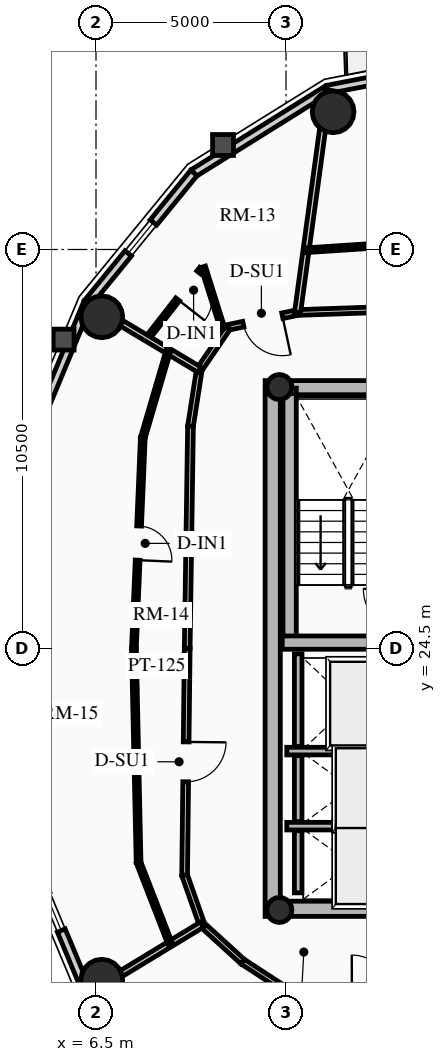
"""IFC4 building model, lengths in metres.
Left out: names, types, materials, properties, quantities, classifications, styles, units other than length and angle.
Written with IfcOpenShell. Run it as: python <this file> out.ifc"""

import sys

from ifc_helpers import new_model, si_unit, direction, frame, frame_2d, origin, origin_2d, place, context, subcontext, project, spatial, rectangle, circle, hollow_circle, extrude, source, transform, mapped, element, fill, save


model = new_model("IFC4")
c1 = context("Model", 3, precision=1e-05, world=origin(), true_north=direction((0.0, 1.0)))
c2 = subcontext(c1, "Body", "Model", "MODEL_VIEW")
j1 = project(units=[si_unit("LENGTHUNIT", "METRE"), si_unit("PLANEANGLEUNIT", "RADIAN")], contexts=[c1])
p1 = place(None, origin())
s1 = spatial("IfcSite", under=j1, at=p1, CompositionType="ELEMENT")
p2 = place(p1, origin())
s2 = spatial("IfcBuilding", under=s1, at=p2, CompositionType="ELEMENT")
p3 = place(p2, frame((0.0, 0.0, 217.03)))
s3 = spatial("IfcBuildingStorey", under=s2, at=p3, CompositionType="ELEMENT", Elevation=217.03)
p4 = place(p3, frame((11.15, 17.45, 0.0), z_axis=(0.0, 0.0, 1.0), x_axis=(0.0, 1.0, 0.0)))
e1 = element("IfcWall", 1, at=p4, inside=s3, PredefinedType="SHEAR", context=c2, shape_type="SweptSolid", body=[
    extrude(rectangle(XDim=14.1, YDim=0.4, at=frame_2d((7.05, 0.0))), origin(), (0.0, 0.0, 1.0), 2.91),
])
p5 = place(p3, frame((11.15, 17.65, 0.0), z_axis=(0.0, 0.0, 1.0), x_axis=(1.0, 0.0, 0.0)))
e2 = element("IfcWall", 2, at=p5, inside=s3, PredefinedType="SHEAR", context=c2, shape_type="SweptSolid", body=[
    extrude(rectangle(XDim=10.7, YDim=0.4, at=frame_2d((5.35, 0.0))), origin(), (0.0, 0.0, 1.0), 2.91),
])
m1 = source(origin(), c2, "Body", "SweptSolid", [
    extrude(rectangle(XDim=1.5, YDim=2.02, at=frame_2d((0.75, 1.01))), frame((0.0, 0.21, 0.0), z_axis=(0.0, -1.0, 0.0), x_axis=(1.0, 0.0, 0.0)), (0.0, 0.0, 1.0), 0.42),
])
p6 = place(p5, frame((5.45, 0.0, 0.0)))
e3 = element("IfcOpeningElement", 3, at=p6, cuts=e2, PredefinedType="OPENING", context=c2, shape_type="MappedRepresentation", body=[
    mapped(m1, transform((0.0, 0.0, 0.0), x_axis=(1.0, 0.0, 0.0), y_axis=(0.0, 1.0, 0.0), z_axis=(0.0, 0.0, 1.0), scale=1.0)),
])
p7 = place(p3, frame((11.15, 31.35, 0.0), z_axis=(0.0, 0.0, 1.0), x_axis=(1.0, 0.0, 0.0)))
e4 = element("IfcWall", 4, at=p7, inside=s3, PredefinedType="SHEAR", context=c2, shape_type="SweptSolid", body=[
    extrude(rectangle(XDim=10.7, YDim=0.4, at=frame_2d((5.35, 0.0))), origin(), (0.0, 0.0, 1.0), 2.91),
])
p8 = place(p7, frame((4.6, 0.0, 0.0)))
e5 = element("IfcOpeningElement", 5, at=p8, cuts=e4, PredefinedType="OPENING", context=c2, shape_type="MappedRepresentation", body=[
    mapped(m1, transform((0.0, 0.0, 0.0), x_axis=(1.0, 0.0, 0.0), y_axis=(0.0, 1.0, 0.0), z_axis=(0.0, 0.0, 1.0), scale=1.0)),
])
p9 = place(p3, frame((11.595, 24.655, 0.0), z_axis=(0.0, 0.0, 1.0), x_axis=(0.0, 1.0, 0.0)))
e6 = element("IfcWall", 6, at=p9, inside=s3, PredefinedType="SHEAR", context=c2, shape_type="SweptSolid", body=[
    extrude(rectangle(XDim=6.695, YDim=0.35, at=frame_2d((3.348, 0.0))), origin(), (0.0, 0.0, 1.0), 2.91),
])
p10 = place(p3, frame((11.4, 24.655, 0.0), z_axis=(0.0, 0.0, 1.0), x_axis=(1.0, 0.0, 0.0)))
e7 = element("IfcWall", 7, at=p10, inside=s3, PredefinedType="SHEAR", context=c2, shape_type="SweptSolid", body=[
    extrude(rectangle(XDim=3.285, YDim=0.35, at=frame_2d((1.643, 0.0))), origin(), (0.0, 0.0, 1.0), 2.91),
])
for number, where, z_axis, x_axis in (
    (8, (11.325, 17.62, 0.0), (0.0, 0.0, 1.0), (1.0, 0.0, 0.0)),
    (9, (11.325, 31.38, 0.0), (0.0, 0.0, 1.0), (1.0, 0.0, 0.0)),
):
    element("IfcColumn", number, at=place(p3, frame(where, z_axis=z_axis, x_axis=x_axis)), inside=s3, PredefinedType="COLUMN", context=c2, shape_type="SweptSolid", body=[
        extrude(hollow_circle(Radius=0.33, WallThickness=0.025, at=origin_2d()), origin(), (0.0, 0.0, 1.0), 2.91),
    ])
for number, where, z_axis, x_axis in (
    (10, (12.739, 38.623, 0.0), (0.0, 0.0, 1.0), (1.0, 0.0, 0.0)),
    (11, (6.653, 33.229, 0.0), (0.0, 0.0, 1.0), (1.0, 0.0, 0.0)),
    (12, (6.653, 15.771, 0.0), (0.0, 0.0, 1.0), (1.0, 0.0, 0.0)),
):
    element("IfcColumn", number, at=place(p3, frame(where, z_axis=z_axis, x_axis=x_axis)), inside=s3, PredefinedType="USERDEFINED", context=c2, shape_type="SweptSolid", body=[
        extrude(circle(Radius=0.55, at=origin_2d()), origin(), (0.0, 0.0, 1.0), 2.91),
    ])
p11 = place(p3, frame((12.597, 39.213, 0.0), z_axis=(0.0, 0.0, 1.0), x_axis=(0.981700307484, 0.190432419211, 0.0)))
e13 = element("IfcWall", 13, at=p11, inside=s3, PredefinedType="SOLIDWALL", context=c2, shape_type="SweptSolid", body=[
    extrude(rectangle(XDim=3.976, YDim=0.22, at=frame_2d((1.988, 0.0))), origin(), (0.0, 0.0, 1.0), 2.322),
])
m2 = source(origin(), c2, "Body", "SweptSolid", [
    extrude(rectangle(XDim=1.15, YDim=2.005, at=frame_2d((0.575, 1.002))), frame((0.0, 0.12, 0.0), z_axis=(0.0, -1.0, 0.0), x_axis=(1.0, 0.0, 0.0)), (0.0, 0.0, 1.0), 0.24),
])
p12 = place(p11, frame((1.413, 0.0, 0.0)))
e14 = element("IfcOpeningElement", 14, at=p12, cuts=e13, PredefinedType="OPENING", context=c2, shape_type="MappedRepresentation", body=[
    mapped(m2, transform((0.0, 0.0, 0.0), x_axis=(1.0, 0.0, 0.0), y_axis=(0.0, 1.0, 0.0), z_axis=(0.0, 0.0, 1.0), scale=1.0)),
])
p13 = place(p3, frame((9.076, 37.015, 0.0), z_axis=(0.0, 0.0, 1.0), x_axis=(0.848318713376, 0.529485939886, 0.0)))
e15 = element("IfcWall", 15, at=p13, inside=s3, PredefinedType="SOLIDWALL", context=c2, shape_type="SweptSolid", body=[
    extrude(rectangle(XDim=4.15, YDim=0.22, at=frame_2d((2.075, 0.0))), origin(), (0.0, 0.0, 1.0), 2.322),
])
p14 = place(p3, frame((6.282, 33.593, 0.0), z_axis=(0.0, 0.0, 1.0), x_axis=(0.632467166636, 0.774587169483, 0.0)))
e16 = element("IfcWall", 16, at=p14, inside=s3, PredefinedType="SOLIDWALL", context=c2, shape_type="SweptSolid", body=[
    extrude(rectangle(XDim=4.418, YDim=0.22, at=frame_2d((2.209, 0.0))), origin(), (0.0, 0.0, 1.0), 2.322),
])
m3 = source(origin(), c2, "Body", "SweptSolid", [
    extrude(rectangle(XDim=1.05, YDim=1.3, at=frame_2d((0.525, 0.65))), frame((0.0, 0.12, 0.0), z_axis=(0.0, -1.0, 0.0), x_axis=(1.0, 0.0, 0.0)), (0.0, 0.0, 1.0), 0.24),
])
p15 = place(p14, frame((1.684, 0.0, 0.65)))
e17 = element("IfcOpeningElement", 17, at=p15, cuts=e16, PredefinedType="OPENING", context=c2, shape_type="MappedRepresentation", body=[
    mapped(m3, transform((0.0, 0.0, 0.0), x_axis=(1.0, 0.0, 0.0), y_axis=(0.0, 1.0, 0.0), z_axis=(0.0, 0.0, 1.0), scale=1.0)),
])
p16 = place(p3, frame((4.488, 29.281, 0.0), z_axis=(0.0, 0.0, 1.0), x_axis=(0.384036305194, 0.923317993052, 0.0)))
e18 = element("IfcWall", 18, at=p16, inside=s3, PredefinedType="SOLIDWALL", context=c2, shape_type="SweptSolid", body=[
    extrude(rectangle(XDim=4.671, YDim=0.22, at=frame_2d((2.335, 0.0))), origin(), (0.0, 0.0, 1.0), 2.322),
])
p17 = place(p3, frame((6.282, 15.407, 0.0), z_axis=(0.0, 0.0, 1.0), x_axis=(-0.384036305194, 0.923317993052, 0.0)))
e19 = element("IfcWall", 19, at=p17, inside=s3, PredefinedType="SOLIDWALL", context=c2, shape_type="SweptSolid", body=[
    extrude(rectangle(XDim=4.671, YDim=0.22, at=frame_2d((2.335, 0.0))), origin(), (0.0, 0.0, 1.0), 2.322),
])
p18 = place(p17, frame((1.81, 0.0, 0.65)))
e20 = element("IfcOpeningElement", 20, at=p18, cuts=e19, PredefinedType="OPENING", context=c2, shape_type="MappedRepresentation", body=[
    mapped(m3, transform((0.0, 0.0, 0.0), x_axis=(1.0, 0.0, 0.0), y_axis=(0.0, 1.0, 0.0), z_axis=(0.0, 0.0, 1.0), scale=1.0)),
])
p19 = place(p3, frame((11.52, 21.8, 0.0), z_axis=(0.0, 0.0, 1.0), x_axis=(1.0, 0.0, 0.0)))
e21 = element("IfcWall", 21, at=p19, inside=s3, PredefinedType="SHEAR", context=c2, shape_type="SweptSolid", body=[
    extrude(rectangle(XDim=2.97, YDim=0.2, at=frame_2d((1.485, 0.0))), origin(), (0.0, 0.0, 1.0), 2.91),
])
p20 = place(p3, frame((11.82, 21.92, 0.0), z_axis=(0.0, 0.0, 1.0), x_axis=(0.0, 1.0, 0.0)))
e22 = element("IfcWall", 22, at=p20, inside=s3, PredefinedType="SHEAR", context=c2, shape_type="SweptSolid", body=[
    extrude(rectangle(XDim=2.44, YDim=0.2, at=frame_2d((1.22, 0.0))), origin(), (0.0, 0.0, 1.0), 2.91),
])
p21 = place(p3, frame((11.52, 19.825, 0.0), z_axis=(0.0, 0.0, 1.0), x_axis=(1.0, 0.0, 0.0)))
e23 = element("IfcWall", 23, at=p21, inside=s3, PredefinedType="SHEAR", context=c2, shape_type="SweptSolid", body=[
    extrude(rectangle(XDim=2.97, YDim=0.2, at=frame_2d((1.485, 0.0))), origin(), (0.0, 0.0, 1.0), 2.91),
])
p22 = place(p3, frame((11.82, 19.945, 0.0), z_axis=(0.0, 0.0, 1.0), x_axis=(0.0, 1.0, 0.0)))
e24 = element("IfcWall", 24, at=p22, inside=s3, PredefinedType="SHEAR", context=c2, shape_type="SweptSolid", body=[
    extrude(rectangle(XDim=1.735, YDim=0.2, at=frame_2d((0.867, 0.0))), origin(), (0.0, 0.0, 1.0), 2.91),
])
p23 = place(p3, frame((11.82, 18.07, 0.0), z_axis=(0.0, 0.0, 1.0), x_axis=(0.0, 1.0, 0.0)))
e25 = element("IfcWall", 25, at=p23, inside=s3, PredefinedType="SHEAR", context=c2, shape_type="SweptSolid", body=[
    extrude(rectangle(XDim=1.635, YDim=0.2, at=frame_2d((0.817, 0.0))), origin(), (0.0, 0.0, 1.0), 2.91),
])
p24 = place(p3, frame((18.082, 33.56, 0.0), z_axis=(0.0, 0.0, 1.0), x_axis=(-0.999399009709, -0.034664382185, 0.0)))
e26 = element("IfcWall", 26, at=p24, inside=s3, PredefinedType="PARTITIONING", context=c2, shape_type="SweptSolid", body=[
    extrude(rectangle(XDim=6.282, YDim=0.15, at=frame_2d((3.141, 0.0))), origin(), (0.0, 0.0, 1.0), 2.255),
])
p25 = place(p3, frame((11.803, 33.342, 0.0), z_axis=(0.0, 0.0, 1.0), x_axis=(-0.977750742783, -0.209770076483, 0.0)))
e27 = element("IfcWall", 27, at=p25, inside=s3, PredefinedType="PARTITIONING", context=c2, shape_type="SweptSolid", body=[
    extrude(rectangle(XDim=1.868, YDim=0.15, at=frame_2d((0.934, 0.0))), origin(), (0.0, 0.0, 1.0), 2.255),
])
m4 = source(origin(), c2, "Body", "SweptSolid", [
    extrude(rectangle(XDim=1.05, YDim=2.015, at=frame_2d((0.525, 1.007))), frame((0.0, 0.085, 0.0), z_axis=(0.0, -1.0, 0.0), x_axis=(1.0, 0.0, 0.0)), (0.0, 0.0, 1.0), 0.17),
])
p26 = place(p25, frame((0.409, 0.0, 0.0)))
e28 = element("IfcOpeningElement", 28, at=p26, cuts=e27, PredefinedType="OPENING", context=c2, shape_type="MappedRepresentation", body=[
    mapped(m4, transform((0.0, 0.0, 0.0), x_axis=(1.0, 0.0, 0.0), y_axis=(0.0, 1.0, 0.0), z_axis=(0.0, 0.0, 1.0), scale=1.0)),
])
p27 = place(p3, frame((9.977, 32.95, 0.0), z_axis=(0.0, 0.0, 1.0), x_axis=(-0.563291804539, -0.826258036535, 0.0)))
e29 = element("IfcWall", 29, at=p27, inside=s3, PredefinedType="PARTITIONING", context=c2, shape_type="SweptSolid", body=[
    extrude(rectangle(XDim=1.346, YDim=0.15, at=frame_2d((0.673, 0.0))), origin(), (0.0, 0.0, 1.0), 2.322),
])
p28 = place(p3, frame((9.219, 31.838, 0.0), z_axis=(0.0, 0.0, 1.0), x_axis=(-0.154065528966, -0.98806063214, 0.0)))
e30 = element("IfcWall", 30, at=p28, inside=s3, PredefinedType="PARTITIONING", context=c2, shape_type="SweptSolid", body=[
    extrude(rectangle(XDim=1.507, YDim=0.15, at=frame_2d((0.753, 0.0))), origin(), (0.0, 0.0, 1.0), 2.255),
])
p29 = place(p3, frame((8.986, 30.349, 0.0), z_axis=(0.0, 0.0, 1.0), x_axis=(-0.014775478218, -0.999890836663, 0.0)))
e31 = element("IfcWall", 31, at=p29, inside=s3, PredefinedType="PARTITIONING", context=c2, shape_type="SweptSolid", body=[
    extrude(rectangle(XDim=5.849, YDim=0.15, at=frame_2d((2.925, 0.0))), origin(), (0.0, 0.0, 1.0), 2.685),
])
p30 = place(p3, frame((8.9, 24.5, 0.0), z_axis=(0.0, 0.0, 1.0), x_axis=(-0.011416369353, -0.999934831132, 0.0)))
e32 = element("IfcWall", 32, at=p30, inside=s3, PredefinedType="PARTITIONING", context=c2, shape_type="SweptSolid", body=[
    extrude(rectangle(XDim=5.967, YDim=0.15, at=frame_2d((2.983, 0.0))), origin(), (0.0, 0.0, 1.0), 2.322),
])
p31 = place(p30, frame((2.458, 0.0, 0.0)))
e33 = element("IfcOpeningElement", 33, at=p31, cuts=e32, PredefinedType="OPENING", context=c2, shape_type="MappedRepresentation", body=[
    mapped(m4, transform((0.0, 0.0, 0.0), x_axis=(1.0, 0.0, 0.0), y_axis=(0.0, 1.0, 0.0), z_axis=(0.0, 0.0, 1.0), scale=1.0)),
])
p32 = place(p3, frame((8.832, 18.534, 0.0), z_axis=(0.0, 0.0, 1.0), x_axis=(0.332031819657, -0.943268186008, 0.0)))
e34 = element("IfcWall", 34, at=p32, inside=s3, PredefinedType="PARTITIONING", context=c2, shape_type="SweptSolid", body=[
    extrude(rectangle(XDim=1.377, YDim=0.15, at=frame_2d((0.688, 0.0))), origin(), (0.0, 0.0, 1.0), 2.255),
])
p33 = place(p3, frame((9.289, 17.235, 0.0), z_axis=(0.0, 0.0, 1.0), x_axis=(0.739015164946, -0.673688790155, 0.0)))
e35 = element("IfcWall", 35, at=p33, inside=s3, PredefinedType="PARTITIONING", context=c2, shape_type="SweptSolid", body=[
    extrude(rectangle(XDim=1.446, YDim=0.15, at=frame_2d((0.723, 0.0))), origin(), (0.0, 0.0, 1.0), 2.322),
])
p34 = place(p3, frame((10.358, 16.26, 0.0), z_axis=(0.0, 0.0, 1.0), x_axis=(0.838265397059, -0.545262435983, 0.0)))
e36 = element("IfcWall", 36, at=p34, inside=s3, PredefinedType="PARTITIONING", context=c2, shape_type="SweptSolid", body=[
    extrude(rectangle(XDim=1.534, YDim=0.15, at=frame_2d((0.767, 0.0))), origin(), (0.0, 0.0, 1.0), 2.255),
])
p35 = place(p3, frame((11.803, 33.342, 0.0), z_axis=(0.0, 0.0, 1.0), x_axis=(0.135452591041, 0.990783828885, 0.0)))
e37 = element("IfcWall", 37, at=p35, inside=s3, PredefinedType="PARTITIONING", context=c2, shape_type="SweptSolid", body=[
    extrude(rectangle(XDim=5.906, YDim=0.16, at=frame_2d((2.953, 0.0))), origin(), (0.0, 0.0, 1.0), 2.322),
])
p36 = place(p3, frame((9.219, 31.838, 0.0), z_axis=(0.0, 0.0, 1.0), x_axis=(-0.858586714977, 0.512668365384, 0.0)))
e38 = element("IfcWall", 38, at=p36, inside=s3, PredefinedType="PARTITIONING", context=c2, shape_type="SweptSolid", body=[
    extrude(rectangle(XDim=3.401, YDim=0.16, at=frame_2d((1.701, 0.0))), origin(), (0.0, 0.0, 1.0), 2.322),
])
p37 = place(p3, frame((9.289, 17.235, 0.0), z_axis=(0.0, 0.0, 1.0), x_axis=(-0.854741081983, -0.519054604806, 0.0)))
e39 = element("IfcWall", 39, at=p37, inside=s3, PredefinedType="PARTITIONING", context=c2, shape_type="SweptSolid", body=[
    extrude(rectangle(XDim=3.499, YDim=0.16, at=frame_2d((1.75, 0.0))), origin(), (0.0, 0.0, 1.0), 2.322),
])
p38 = place(p3, frame((17.639, 35.349, 0.0), z_axis=(0.0, 0.0, 1.0), x_axis=(-0.997849042159, -0.065553711275, 0.0)))
e40 = element("IfcWall", 40, at=p38, inside=s3, PredefinedType="PARTITIONING", context=c2, shape_type="SweptSolid", body=[
    extrude(rectangle(XDim=5.624, YDim=0.125, at=frame_2d((2.812, 0.0))), origin(), (0.0, 0.0, 1.0), 2.255),
])
m5 = source(origin(), c2, "Body", "SweptSolid", [
    extrude(rectangle(XDim=0.9, YDim=2.005, at=frame_2d((0.45, 1.002))), frame((0.0, 0.073, 0.0), z_axis=(0.0, -1.0, 0.0), x_axis=(1.0, 0.0, 0.0)), (0.0, 0.0, 1.0), 0.145),
])
p39 = place(p38, frame((2.362, 0.0, 0.0)))
e41 = element("IfcOpeningElement", 41, at=p39, cuts=e40, PredefinedType="OPENING", context=c2, shape_type="MappedRepresentation", body=[
    mapped(m5, transform((0.0, 0.0, 0.0), x_axis=(1.0, 0.0, 0.0), y_axis=(0.0, 1.0, 0.0), z_axis=(0.0, 0.0, 1.0), scale=1.0)),
])
p40 = place(p3, frame((9.835, 32.906, 0.0), z_axis=(0.0, 0.0, 1.0), x_axis=(-0.300376803481, 0.953820620416, 0.0)))
e42 = element("IfcWall", 42, at=p40, inside=s3, PredefinedType="PARTITIONING", context=c2, shape_type="SweptSolid", body=[
    extrude(rectangle(XDim=1.719, YDim=0.125, at=frame_2d((0.859, 0.0))), origin(), (0.0, 0.0, 1.0), 2.685),
])
p41 = place(p3, frame((9.276, 34.491, 0.0), z_axis=(0.0, 0.0, 1.0), x_axis=(-0.615039973806, -0.788495929362, 0.0)))
e43 = element("IfcWall", 43, at=p41, inside=s3, PredefinedType="PARTITIONING", context=c2, shape_type="SweptSolid", body=[
    extrude(rectangle(XDim=2.228, YDim=0.125, at=frame_2d((1.114, 0.0))), origin(), (0.0, 0.0, 1.0), 2.322),
])
p42 = place(p41, frame((0.12, 0.0, 0.0)))
e44 = element("IfcOpeningElement", 44, at=p42, cuts=e43, PredefinedType="OPENING", context=c2, shape_type="MappedRepresentation", body=[
    mapped(m5, transform((0.0, 0.0, 0.0), x_axis=(1.0, 0.0, 0.0), y_axis=(0.0, 1.0, 0.0), z_axis=(0.0, 0.0, 1.0), scale=1.0)),
])
p43 = place(p3, frame((8.401, 32.326, 0.0), z_axis=(0.0, 0.0, 1.0), x_axis=(-0.281681886596, -0.959507850288, 0.0)))
e45 = element("IfcWall", 45, at=p43, inside=s3, PredefinedType="PARTITIONING", context=c2, shape_type="SweptSolid", body=[
    extrude(rectangle(XDim=2.374, YDim=0.125, at=frame_2d((1.187, 0.0))), origin(), (0.0, 0.0, 1.0), 2.255),
])
p44 = place(p3, frame((7.732, 30.048, 0.0), z_axis=(0.0, 0.0, 1.0), x_axis=(-0.042296211955, -0.999105114817, 0.0)))
e46 = element("IfcWall", 46, at=p44, inside=s3, PredefinedType="PARTITIONING", context=c2, shape_type="SweptSolid", body=[
    extrude(rectangle(XDim=5.553, YDim=0.125, at=frame_2d((2.776, 0.0))), origin(), (0.0, 0.0, 1.0), 2.685),
])
p45 = place(p44, frame((2.326, 0.0, 0.0)))
e47 = element("IfcOpeningElement", 47, at=p45, cuts=e46, PredefinedType="OPENING", context=c2, shape_type="MappedRepresentation", body=[
    mapped(m5, transform((0.0, 0.0, 0.0), x_axis=(1.0, 0.0, 0.0), y_axis=(0.0, 1.0, 0.0), z_axis=(0.0, 0.0, 1.0), scale=1.0)),
])
p46 = place(p3, frame((7.497, 24.5, 0.0), z_axis=(0.0, 0.0, 1.0), x_axis=(0.021927972859, -0.999759553096, 0.0)))
e48 = element("IfcWall", 48, at=p46, inside=s3, PredefinedType="PARTITIONING", context=c2, shape_type="SweptSolid", body=[
    extrude(rectangle(XDim=5.634, YDim=0.125, at=frame_2d((2.817, 0.0))), origin(), (0.0, 0.0, 1.0), 2.322),
])
p47 = place(p3, frame((7.621, 18.868, 0.0), z_axis=(0.0, 0.0, 1.0), x_axis=(0.361712646649, -0.93228963378, 0.0)))
e49 = element("IfcWall", 49, at=p47, inside=s3, PredefinedType="PARTITIONING", context=c2, shape_type="SweptSolid", body=[
    extrude(rectangle(XDim=2.297, YDim=0.125, at=frame_2d((1.148, 0.0))), origin(), (0.0, 0.0, 1.0), 2.255),
])
m6 = source(origin(), c2, "Body", "SweptSolid", [
    extrude(rectangle(XDim=1.05, YDim=1.3, at=frame_2d((0.525, 0.65))), frame((0.0, 0.03, 0.0), z_axis=(0.0, -1.0, 0.0), x_axis=(1.0, 0.0, 0.0)), (0.0, 0.0, 1.0), 0.06),
])
p48 = place(p15, origin())
e50 = element("IfcWindow", 50, at=p48, inside=s3, PartitioningType="SINGLE_PANEL", PredefinedType="WINDOW", context=c2, shape_type="MappedRepresentation", body=[
    mapped(m6, transform((0.0, 0.0, 0.0), x_axis=(1.0, 0.0, 0.0), y_axis=(0.0, 1.0, 0.0), z_axis=(0.0, 0.0, 1.0), scale=1.0)),
])
fill(e17, e50)
p49 = place(p18, origin())
e51 = element("IfcWindow", 51, at=p49, inside=s3, PartitioningType="SINGLE_PANEL", PredefinedType="WINDOW", context=c2, shape_type="MappedRepresentation", body=[
    mapped(m6, transform((0.0, 0.0, 0.0), x_axis=(1.0, 0.0, 0.0), y_axis=(0.0, 1.0, 0.0), z_axis=(0.0, 0.0, 1.0), scale=1.0)),
])
fill(e20, e51)
m7 = source(origin(), c2, "Body", "SweptSolid", [
    extrude(rectangle(XDim=1.05, YDim=2.015, at=frame_2d((0.525, 1.007))), frame((0.0, 0.025, 0.0), z_axis=(0.0, -1.0, 0.0), x_axis=(1.0, 0.0, 0.0)), (0.0, 0.0, 1.0), 0.05),
])
p50 = place(p26, origin())
e52 = element("IfcDoor", 52, at=p50, inside=s3, OperationType="SINGLE_SWING_LEFT", PredefinedType="DOOR", context=c2, shape_type="MappedRepresentation", body=[
    mapped(m7, transform((0.0, 0.0, 0.0), x_axis=(1.0, 0.0, 0.0), y_axis=(0.0, 1.0, 0.0), z_axis=(0.0, 0.0, 1.0), scale=1.0)),
])
fill(e28, e52)
m8 = source(origin(), c2, "Body", "SweptSolid", [
    extrude(rectangle(XDim=0.9, YDim=2.005, at=frame_2d((0.45, 1.002))), frame((0.0, 0.025, 0.0), z_axis=(0.0, -1.0, 0.0), x_axis=(1.0, 0.0, 0.0)), (0.0, 0.0, 1.0), 0.05),
])
p51 = place(p42, origin())
e53 = element("IfcDoor", 53, at=p51, inside=s3, OperationType="SINGLE_SWING_RIGHT", PredefinedType="DOOR", context=c2, shape_type="MappedRepresentation", body=[
    mapped(m8, transform((0.0, 0.0, 0.0), x_axis=(1.0, 0.0, 0.0), y_axis=(0.0, 1.0, 0.0), z_axis=(0.0, 0.0, 1.0), scale=1.0)),
])
fill(e44, e53)
p52 = place(p31, origin())
e54 = element("IfcDoor", 54, at=p52, inside=s3, OperationType="SINGLE_SWING_LEFT", PredefinedType="DOOR", context=c2, shape_type="MappedRepresentation", body=[
    mapped(m7, transform((0.0, 0.0, 0.0), x_axis=(1.0, 0.0, 0.0), y_axis=(0.0, 1.0, 0.0), z_axis=(0.0, 0.0, 1.0), scale=1.0)),
])
fill(e33, e54)
p53 = place(p45, origin())
e55 = element("IfcDoor", 55, at=p53, inside=s3, OperationType="SINGLE_SWING_RIGHT", PredefinedType="DOOR", context=c2, shape_type="MappedRepresentation", body=[
    mapped(m8, transform((0.0, 0.0, 0.0), x_axis=(1.0, 0.0, 0.0), y_axis=(0.0, 1.0, 0.0), z_axis=(0.0, 0.0, 1.0), scale=1.0)),
])
fill(e47, e55)
save(model, sys.argv[1])
